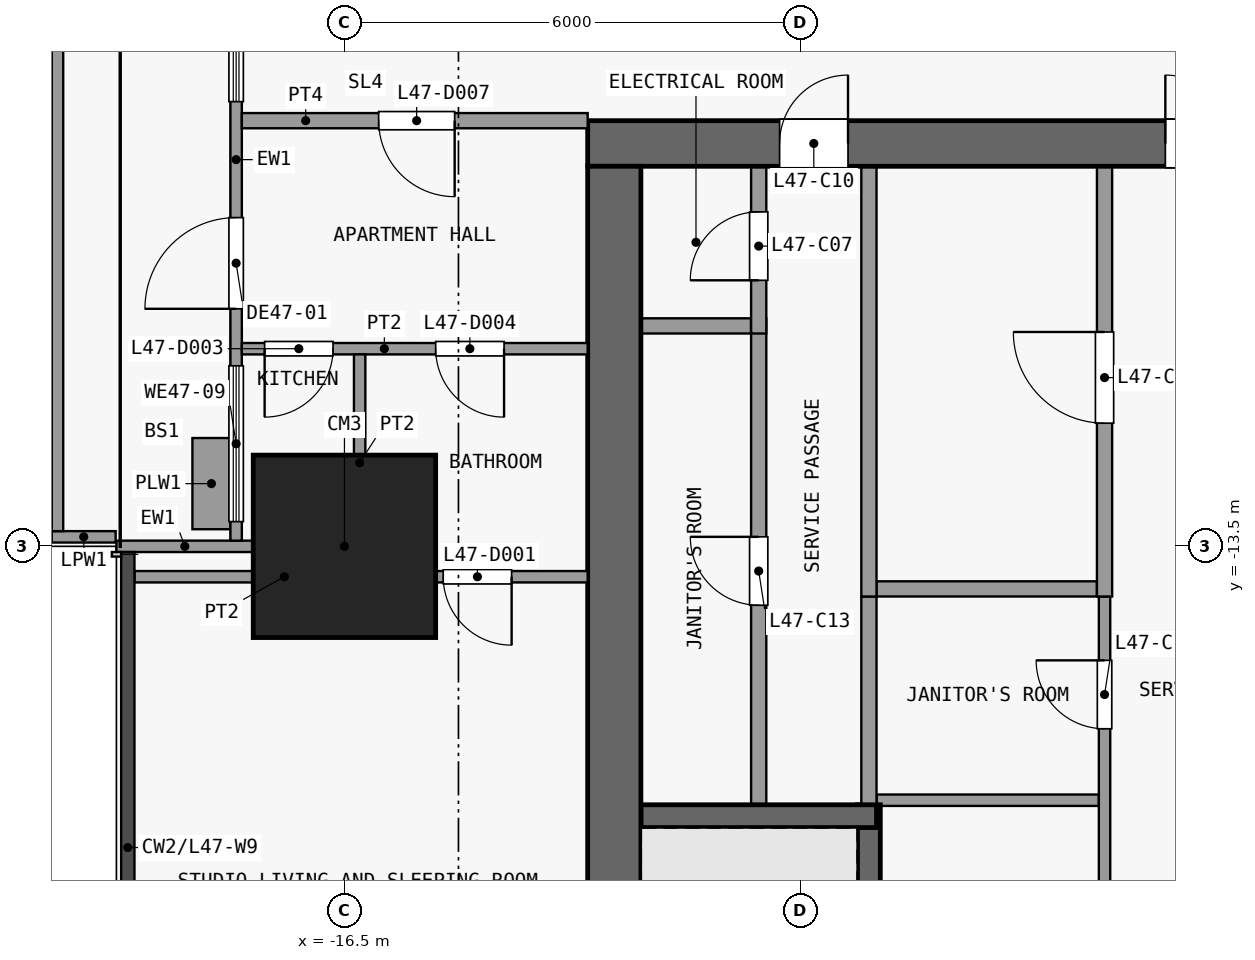
"""IFC4 building model, lengths in metres.
Left out: names, types, materials, properties, quantities, classifications, styles, units other than length and angle.
Written with IfcOpenShell. Run it as: python <this file> out.ifc"""

import sys

from ifc_helpers import new_model, si_unit, direction, frame, frame_2d, origin, origin_2d, place, context, subcontext, project, spatial, rectangle, extrude, element, fill, save


model = new_model("IFC4")
c1 = context("Model", 3, precision=1e-05, world=origin(), true_north=direction((0.0, 1.0)))
c2 = subcontext(c1, "Body", "Model", "MODEL_VIEW")
j1 = project(units=[si_unit("LENGTHUNIT", "METRE"), si_unit("PLANEANGLEUNIT", "RADIAN")], contexts=[c1])
p1 = place(None, origin())
s1 = spatial("IfcSite", under=j1, at=p1, CompositionType="ELEMENT")
p2 = place(p1, origin())
s2 = spatial("IfcBuilding", under=s1, at=p2, CompositionType="ELEMENT")
p3 = place(p2, frame((0.0, 0.0, 188.9)))
s3 = spatial("IfcBuildingStorey", under=s2, at=p3, CompositionType="ELEMENT", Elevation=188.9)
p4 = place(p3, frame((-16.5, -13.5, 0.0), z_axis=(0.0, 0.0, 1.0), x_axis=(1.0, 0.0, 0.0)))
e1 = element("IfcColumn", 1, at=p4, inside=s3, PredefinedType="COLUMN", context=c2, shape_type="SweptSolid", body=[
    extrude(rectangle(XDim=2.4, YDim=2.4, at=origin_2d()), origin(), (0.0, 0.0, 1.0), 3.6),
])
p5 = place(p3, frame((-13.3, -8.2, 0.0), z_axis=(0.0, 0.0, 1.0), x_axis=(1.0, 0.0, 0.0)))
e2 = element("IfcWall", 2, at=p5, inside=s3, PredefinedType="SHEAR", context=c2, shape_type="SweptSolid", body=[
    extrude(rectangle(XDim=26.6, YDim=0.6, at=frame_2d((13.3, 0.0))), origin(), (0.0, 0.0, 1.0), 3.3),
])
p6 = place(p5, frame((7.6, 0.0, 0.0)))
e3 = element("IfcOpeningElement", 3, at=p6, cuts=e2, PredefinedType="OPENING", context=c2, shape_type="SweptSolid", body=[
    extrude(rectangle(XDim=1.8, YDim=2.1, at=frame_2d((0.9, 1.05))), frame((0.0, 0.31, 0.0), z_axis=(0.0, -1.0, 0.0), x_axis=(1.0, 0.0, 0.0)), (0.0, 0.0, 1.0), 0.62),
])
p7 = place(p5, frame((17.2, 0.0, 0.0)))
e4 = element("IfcOpeningElement", 4, at=p7, cuts=e2, PredefinedType="OPENING", context=c2, shape_type="SweptSolid", body=[
    extrude(rectangle(XDim=1.8, YDim=2.1, at=frame_2d((0.9, 1.05))), frame((0.0, 0.31, 0.0), z_axis=(0.0, -1.0, 0.0), x_axis=(1.0, 0.0, 0.0)), (0.0, 0.0, 1.0), 0.62),
])
p8 = place(p5, frame((2.525, 0.0, 0.0)))
e5 = element("IfcOpeningElement", 5, at=p8, cuts=e2, PredefinedType="OPENING", context=c2, shape_type="SweptSolid", body=[
    extrude(rectangle(XDim=0.9, YDim=2.1, at=frame_2d((0.45, 1.05))), frame((0.0, 0.31, 0.0), z_axis=(0.0, -1.0, 0.0), x_axis=(1.0, 0.0, 0.0)), (0.0, 0.0, 1.0), 0.62),
])
p9 = place(p5, frame((23.175, 0.0, 0.0)))
e6 = element("IfcOpeningElement", 6, at=p9, cuts=e2, PredefinedType="OPENING", context=c2, shape_type="SweptSolid", body=[
    extrude(rectangle(XDim=0.9, YDim=2.1, at=frame_2d((0.45, 1.05))), frame((0.0, 0.31, 0.0), z_axis=(0.0, -1.0, 0.0), x_axis=(1.0, 0.0, 0.0)), (0.0, 0.0, 1.0), 0.62),
])
p10 = place(p3, frame((-12.95, -24.6, 0.0), z_axis=(0.0, 0.0, 1.0), x_axis=(0.0, 1.0, 0.0)))
e7 = element("IfcWall", 7, at=p10, inside=s3, PredefinedType="SHEAR", context=c2, shape_type="SweptSolid", body=[
    extrude(rectangle(XDim=16.1, YDim=0.7, at=frame_2d((8.05, 0.0))), origin(), (0.0, 0.0, 1.0), 3.3),
])
p11 = place(p3, frame((-12.6, -17.05, 0.0), z_axis=(0.0, 0.0, 1.0), x_axis=(1.0, 0.0, 0.0)))
e8 = element("IfcWall", 8, at=p11, inside=s3, PredefinedType="SHEAR", context=c2, shape_type="SweptSolid", body=[
    extrude(rectangle(XDim=3.1, YDim=0.3, at=frame_2d((1.55, 0.0))), origin(), (0.0, 0.0, 1.0), 3.3),
])
p12 = place(p3, frame((-9.5, -16.84, 0.0), z_axis=(0.0, 0.0, 1.0), x_axis=(1.0, 0.0, 0.0)))
e9 = element("IfcWall", 9, at=p12, inside=s3, PredefinedType="PARTITIONING", context=c2, shape_type="SweptSolid", body=[
    extrude(rectangle(XDim=2.925, YDim=0.15, at=frame_2d((1.462, 0.0))), origin(), (0.0, 0.0, 1.0), 3.3),
])
p13 = place(p3, frame((-9.5, -14.06, 0.0), z_axis=(0.0, 0.0, 1.0), x_axis=(1.0, 0.0, 0.0)))
e10 = element("IfcWall", 10, at=p13, inside=s3, PredefinedType="PARTITIONING", context=c2, shape_type="SweptSolid", body=[
    extrude(rectangle(XDim=2.9, YDim=0.2, at=frame_2d((1.45, 0.0))), origin(), (0.0, 0.0, 1.0), 3.3),
])
p14 = place(p3, frame((-12.6, -10.6, 0.0), z_axis=(0.0, 0.0, 1.0), x_axis=(1.0, 0.0, 0.0)))
e11 = element("IfcWall", 11, at=p14, inside=s3, PredefinedType="PARTITIONING", context=c2, shape_type="SweptSolid", body=[
    extrude(rectangle(XDim=1.45, YDim=0.2, at=frame_2d((0.725, 0.0))), origin(), (0.0, 0.0, 1.0), 3.3),
])
p15 = place(p3, frame((-11.05, -16.9, 0.0), z_axis=(0.0, 0.0, 1.0), x_axis=(0.0, 1.0, 0.0)))
e12 = element("IfcWall", 12, at=p15, inside=s3, PredefinedType="PARTITIONING", context=c2, shape_type="SweptSolid", body=[
    extrude(rectangle(XDim=6.4, YDim=0.2, at=frame_2d((3.2, 0.0))), origin(), (0.0, 0.0, 1.0), 3.3),
])
p16 = place(p15, frame((2.625, 0.0, 0.0)))
e13 = element("IfcOpeningElement", 13, at=p16, cuts=e12, PredefinedType="OPENING", context=c2, shape_type="SweptSolid", body=[
    extrude(rectangle(XDim=0.9, YDim=2.1, at=frame_2d((0.45, 1.05))), frame((0.0, 0.11, 0.0), z_axis=(0.0, -1.0, 0.0), x_axis=(1.0, 0.0, 0.0)), (0.0, 0.0, 1.0), 0.22),
])
p17 = place(p3, frame((-11.05, -10.7, 0.0), z_axis=(0.0, 0.0, 1.0), x_axis=(0.0, 1.0, 0.0)))
e14 = element("IfcWall", 14, at=p17, inside=s3, PredefinedType="PARTITIONING", context=c2, shape_type="SweptSolid", body=[
    extrude(rectangle(XDim=2.2, YDim=0.2, at=frame_2d((1.1, 0.0))), origin(), (0.0, 0.0, 1.0), 3.3),
])
p18 = place(p17, frame((0.7, 0.0, 0.0)))
e15 = element("IfcOpeningElement", 15, at=p18, cuts=e14, PredefinedType="OPENING", context=c2, shape_type="SweptSolid", body=[
    extrude(rectangle(XDim=0.9, YDim=2.1, at=frame_2d((0.45, 1.05))), frame((0.0, 0.11, 0.0), z_axis=(0.0, -1.0, 0.0), x_axis=(1.0, 0.0, 0.0)), (0.0, 0.0, 1.0), 0.22),
])
p19 = place(p3, frame((-9.6, -24.6, 0.0), z_axis=(0.0, 0.0, 1.0), x_axis=(0.0, 1.0, 0.0)))
e16 = element("IfcWall", 16, at=p19, inside=s3, PredefinedType="SHEAR", context=c2, shape_type="SweptSolid", body=[
    extrude(rectangle(XDim=7.7, YDim=0.3, at=frame_2d((3.85, 0.0))), origin(), (0.0, 0.0, 1.0), 3.3),
])
p20 = place(p19, frame((0.1, 0.0, 0.0)))
e17 = element("IfcOpeningElement", 17, at=p20, cuts=e16, PredefinedType="OPENING", context=c2, shape_type="SweptSolid", body=[
    extrude(rectangle(XDim=1.1, YDim=2.1, at=frame_2d((0.55, 1.05))), frame((0.0, 0.16, 0.0), z_axis=(0.0, -1.0, 0.0), x_axis=(1.0, 0.0, 0.0)), (0.0, 0.0, 1.0), 0.32),
])
p21 = place(p3, frame((-9.6, -16.9, 0.0), z_axis=(0.0, 0.0, 1.0), x_axis=(0.0, 1.0, 0.0)))
e18 = element("IfcWall", 18, at=p21, inside=s3, PredefinedType="PARTITIONING", context=c2, shape_type="SweptSolid", body=[
    extrude(rectangle(XDim=2.74, YDim=0.2, at=frame_2d((1.37, 0.0))), origin(), (0.0, 0.0, 1.0), 3.3),
])
p22 = place(p3, frame((-9.6, -14.16, 0.0), z_axis=(0.0, 0.0, 1.0), x_axis=(0.0, 1.0, 0.0)))
e19 = element("IfcWall", 19, at=p22, inside=s3, PredefinedType="PARTITIONING", context=c2, shape_type="SweptSolid", body=[
    extrude(rectangle(XDim=5.66, YDim=0.2, at=frame_2d((2.83, 0.0))), origin(), (0.0, 0.0, 1.0), 3.3),
])
p23 = place(p3, frame((-6.5, -22.3, 0.0), z_axis=(0.0, 0.0, 1.0), x_axis=(0.0, 1.0, 0.0)))
e20 = element("IfcWall", 20, at=p23, inside=s3, PredefinedType="PARTITIONING", context=c2, shape_type="SweptSolid", body=[
    extrude(rectangle(XDim=8.14, YDim=0.15, at=frame_2d((4.07, 0.0))), origin(), (0.0, 0.0, 1.0), 3.3),
])
p24 = place(p23, frame((2.08, 0.0, 0.0)))
e21 = element("IfcOpeningElement", 21, at=p24, cuts=e20, PredefinedType="OPENING", context=c2, shape_type="SweptSolid", body=[
    extrude(rectangle(XDim=1.2, YDim=2.1, at=frame_2d((0.6, 1.05))), frame((0.0, 0.085, 0.0), z_axis=(0.0, -1.0, 0.0), x_axis=(1.0, 0.0, 0.0)), (0.0, 0.0, 1.0), 0.17),
])
p25 = place(p23, frame((6.4, 0.0, 0.0)))
e22 = element("IfcOpeningElement", 22, at=p25, cuts=e20, PredefinedType="OPENING", context=c2, shape_type="SweptSolid", body=[
    extrude(rectangle(XDim=0.9, YDim=2.1, at=frame_2d((0.45, 1.05))), frame((0.0, 0.085, 0.0), z_axis=(0.0, -1.0, 0.0), x_axis=(1.0, 0.0, 0.0)), (0.0, 0.0, 1.0), 0.17),
])
p26 = place(p3, frame((-6.5, -14.16, 0.0), z_axis=(0.0, 0.0, 1.0), x_axis=(0.0, 1.0, 0.0)))
e23 = element("IfcWall", 23, at=p26, inside=s3, PredefinedType="PARTITIONING", context=c2, shape_type="SweptSolid", body=[
    extrude(rectangle(XDim=5.66, YDim=0.2, at=frame_2d((2.83, 0.0))), origin(), (0.0, 0.0, 1.0), 3.3),
])
p27 = place(p26, frame((2.28, 0.0, 0.0)))
e24 = element("IfcOpeningElement", 24, at=p27, cuts=e23, PredefinedType="OPENING", context=c2, shape_type="SweptSolid", body=[
    extrude(rectangle(XDim=1.2, YDim=2.1, at=frame_2d((0.6, 1.05))), frame((0.0, 0.11, 0.0), z_axis=(0.0, -1.0, 0.0), x_axis=(1.0, 0.0, 0.0)), (0.0, 0.0, 1.0), 0.22),
])
p28 = place(p3, frame((-17.7, -13.5, 0.0), z_axis=(0.0, 0.0, 1.0), x_axis=(-1.0, 0.0, 0.0)))
e25 = element("IfcWall", 25, at=p28, inside=s3, PredefinedType="SOLIDWALL", context=c2, shape_type="SweptSolid", body=[
    extrude(rectangle(XDim=1.8, YDim=0.15, at=frame_2d((0.9, 0.0))), origin(), (0.0, 0.0, 1.0), 3.3),
])
p29 = place(p3, frame((-17.925, -13.425, 0.0), z_axis=(0.0, 0.0, 1.0), x_axis=(0.0, 1.0, 0.0)))
e26 = element("IfcWall", 26, at=p29, inside=s3, PredefinedType="SOLIDWALL", context=c2, shape_type="SweptSolid", body=[
    extrude(rectangle(XDim=8.925, YDim=0.15, at=frame_2d((4.462, 0.0))), origin(), (0.0, 0.0, 1.0), 3.3),
])
p30 = place(p29, frame((3.05, 0.0, 0.0)))
e27 = element("IfcOpeningElement", 27, at=p30, cuts=e26, PredefinedType="OPENING", context=c2, shape_type="SweptSolid", body=[
    extrude(rectangle(XDim=1.2, YDim=2.4, at=frame_2d((0.6, 1.2))), frame((0.0, 0.085, 0.0), z_axis=(0.0, -1.0, 0.0), x_axis=(1.0, 0.0, 0.0)), (0.0, 0.0, 1.0), 0.17),
])
p31 = place(p29, frame((0.25, 0.0, 0.9)))
e28 = element("IfcOpeningElement", 28, at=p31, cuts=e26, PredefinedType="OPENING", context=c2, shape_type="SweptSolid", body=[
    extrude(rectangle(XDim=2.05, YDim=2.1, at=frame_2d((1.025, 1.05))), frame((0.0, 0.085, 0.0), z_axis=(0.0, -1.0, 0.0), x_axis=(1.0, 0.0, 0.0)), (0.0, 0.0, 1.0), 0.17),
])
p32 = place(p29, frame((5.775, 0.0, 0.9)))
e29 = element("IfcOpeningElement", 29, at=p32, cuts=e26, PredefinedType="OPENING", context=c2, shape_type="SweptSolid", body=[
    extrude(rectangle(XDim=2.312, YDim=2.1, at=frame_2d((1.156, 1.05))), frame((0.0, 0.085, 0.0), z_axis=(0.0, -1.0, 0.0), x_axis=(1.0, 0.0, 0.0)), (0.0, 0.0, 1.0), 0.17),
])
p33 = place(p3, frame((-18.25, -13.275, 0.0), z_axis=(0.0, 0.0, 1.0), x_axis=(0.0, 1.0, 0.0)))
e30 = element("IfcWall", 30, at=p33, inside=s3, PredefinedType="USERDEFINED", context=c2, shape_type="SweptSolid", body=[
    extrude(rectangle(XDim=1.2, YDim=0.5, at=frame_2d((0.6, 0.0))), origin(), (0.0, 0.0, 1.0), 0.9),
])
p34 = place(p3, frame((-19.51, -13.375, 0.0), z_axis=(0.0, 0.0, 1.0), x_axis=(-1.0, 0.0, 0.0)))
e31 = element("IfcWall", 31, at=p34, inside=s3, PredefinedType="PARAPET", context=c2, shape_type="SweptSolid", body=[
    extrude(rectangle(XDim=0.84, YDim=0.15, at=frame_2d((0.42, 0.0))), origin(), (0.0, 0.0, 1.0), 1.15),
])
p35 = place(p3, frame((-20.275, -13.3, 0.0), z_axis=(0.0, 0.0, 1.0), x_axis=(0.0, 1.0, 0.0)))
e32 = element("IfcWall", 32, at=p35, inside=s3, PredefinedType="PARAPET", context=c2, shape_type="SweptSolid", body=[
    extrude(rectangle(XDim=14.79, YDim=0.15, at=frame_2d((7.395, 0.0))), origin(), (0.0, 0.0, 1.0), 1.15),
])
p36 = place(p3, frame((-19.262, -13.9, 0.0), z_axis=(0.0, 0.0, 1.0), x_axis=(1.0, 0.0, 0.0)))
e33 = element("IfcWall", 33, at=p36, inside=s3, PredefinedType="PARTITIONING", context=c2, shape_type="SweptSolid", body=[
    extrude(rectangle(XDim=5.962, YDim=0.15, at=frame_2d((2.981, 0.0))), origin(), (0.0, 0.0, 1.0), 3.3),
])
p37 = place(p36, frame((4.062, 0.0, 0.0)))
e34 = element("IfcOpeningElement", 34, at=p37, cuts=e33, PredefinedType="OPENING", context=c2, shape_type="SweptSolid", body=[
    extrude(rectangle(XDim=0.9, YDim=2.1, at=frame_2d((0.45, 1.05))), frame((0.0, 0.085, 0.0), z_axis=(0.0, -1.0, 0.0), x_axis=(1.0, 0.0, 0.0)), (0.0, 0.0, 1.0), 0.17),
])
p38 = place(p3, frame((-17.85, -10.9, 0.0), z_axis=(0.0, 0.0, 1.0), x_axis=(1.0, 0.0, 0.0)))
e35 = element("IfcWall", 35, at=p38, inside=s3, PredefinedType="PARTITIONING", context=c2, shape_type="SweptSolid", body=[
    extrude(rectangle(XDim=4.55, YDim=0.15, at=frame_2d((2.275, 0.0))), origin(), (0.0, 0.0, 1.0), 3.3),
])
p39 = place(p38, frame((0.3, 0.0, 0.0)))
e36 = element("IfcOpeningElement", 36, at=p39, cuts=e35, PredefinedType="OPENING", context=c2, shape_type="SweptSolid", body=[
    extrude(rectangle(XDim=0.9, YDim=2.1, at=frame_2d((0.45, 1.05))), frame((0.0, 0.085, 0.0), z_axis=(0.0, -1.0, 0.0), x_axis=(1.0, 0.0, 0.0)), (0.0, 0.0, 1.0), 0.17),
])
p40 = place(p38, frame((2.55, 0.0, 0.0)))
e37 = element("IfcOpeningElement", 37, at=p40, cuts=e35, PredefinedType="OPENING", context=c2, shape_type="SweptSolid", body=[
    extrude(rectangle(XDim=0.9, YDim=2.1, at=frame_2d((0.45, 1.05))), frame((0.0, 0.085, 0.0), z_axis=(0.0, -1.0, 0.0), x_axis=(1.0, 0.0, 0.0)), (0.0, 0.0, 1.0), 0.17),
])
p41 = place(p3, frame((-17.85, -7.9, 0.0), z_axis=(0.0, 0.0, 1.0), x_axis=(1.0, 0.0, 0.0)))
e38 = element("IfcWall", 38, at=p41, inside=s3, PredefinedType="PARTITIONING", context=c2, shape_type="SweptSolid", body=[
    extrude(rectangle(XDim=4.55, YDim=0.2, at=frame_2d((2.275, 0.0))), origin(), (0.0, 0.0, 1.0), 3.3),
])
p42 = place(p41, frame((1.8, 0.0, 0.0)))
e39 = element("IfcOpeningElement", 39, at=p42, cuts=e38, PredefinedType="OPENING", context=c2, shape_type="SweptSolid", body=[
    extrude(rectangle(XDim=1.0, YDim=2.1, at=frame_2d((0.5, 1.05))), frame((0.0, 0.11, 0.0), z_axis=(0.0, -1.0, 0.0), x_axis=(1.0, 0.0, 0.0)), (0.0, 0.0, 1.0), 0.22),
])
p43 = place(p3, frame((-16.3, -13.825, 0.0), z_axis=(0.0, 0.0, 1.0), x_axis=(0.0, 1.0, 0.0)))
e40 = element("IfcWall", 40, at=p43, inside=s3, PredefinedType="PARTITIONING", context=c2, shape_type="SweptSolid", body=[
    extrude(rectangle(XDim=2.85, YDim=0.15, at=frame_2d((1.425, 0.0))), origin(), (0.0, 0.0, 1.0), 3.3),
])
p44 = place(p6, origin())
e41 = element("IfcDoor", 41, at=p44, inside=s3, OperationType="DOUBLE_DOOR_SINGLE_SWING", PredefinedType="DOOR", context=c2, shape_type="SweptSolid", body=[
    extrude(rectangle(XDim=1.8, YDim=2.1, at=frame_2d((0.9, 1.05))), frame((0.0, 0.025, 0.0), z_axis=(0.0, -1.0, 0.0), x_axis=(1.0, 0.0, 0.0)), (0.0, 0.0, 1.0), 0.05),
])
fill(e3, e41)
p45 = place(p18, origin())
e42 = element("IfcDoor", 42, at=p45, inside=s3, OperationType="SINGLE_SWING_LEFT", PredefinedType="DOOR", context=c2, shape_type="SweptSolid", body=[
    extrude(rectangle(XDim=0.9, YDim=2.1, at=frame_2d((0.45, 1.05))), frame((0.0, 0.025, 0.0), z_axis=(0.0, -1.0, 0.0), x_axis=(1.0, 0.0, 0.0)), (0.0, 0.0, 1.0), 0.05),
])
fill(e15, e42)
p46 = place(p27, origin())
e43 = element("IfcDoor", 43, at=p46, inside=s3, OperationType="SINGLE_SWING_RIGHT", PredefinedType="DOOR", context=c2, shape_type="SweptSolid", body=[
    extrude(rectangle(XDim=1.2, YDim=2.1, at=frame_2d((0.6, 1.05))), frame((0.0, 0.025, 0.0), z_axis=(0.0, -1.0, 0.0), x_axis=(1.0, 0.0, 0.0)), (0.0, 0.0, 1.0), 0.05),
])
fill(e24, e43)
p47 = place(p8, origin())
e44 = element("IfcDoor", 44, at=p47, inside=s3, OperationType="SINGLE_SWING_RIGHT", PredefinedType="DOOR", context=c2, shape_type="SweptSolid", body=[
    extrude(rectangle(XDim=0.9, YDim=2.1, at=frame_2d((0.45, 1.05))), frame((0.0, 0.025, 0.0), z_axis=(0.0, -1.0, 0.0), x_axis=(1.0, 0.0, 0.0)), (0.0, 0.0, 1.0), 0.05),
])
fill(e5, e44)
p48 = place(p16, origin())
e45 = element("IfcDoor", 45, at=p48, inside=s3, OperationType="SINGLE_SWING_RIGHT", PredefinedType="DOOR", context=c2, shape_type="SweptSolid", body=[
    extrude(rectangle(XDim=0.9, YDim=2.1, at=frame_2d((0.45, 1.05))), frame((0.0, 0.025, 0.0), z_axis=(0.0, -1.0, 0.0), x_axis=(1.0, 0.0, 0.0)), (0.0, 0.0, 1.0), 0.05),
])
fill(e13, e45)
p49 = place(p25, origin())
e46 = element("IfcDoor", 46, at=p49, inside=s3, OperationType="SINGLE_SWING_RIGHT", PredefinedType="DOOR", context=c2, shape_type="SweptSolid", body=[
    extrude(rectangle(XDim=0.9, YDim=2.1, at=frame_2d((0.45, 1.05))), frame((0.0, 0.025, 0.0), z_axis=(0.0, -1.0, 0.0), x_axis=(1.0, 0.0, 0.0)), (0.0, 0.0, 1.0), 0.05),
])
fill(e22, e46)
p50 = place(p30, origin())
e47 = element("IfcDoor", 47, at=p50, inside=s3, OperationType="SINGLE_SWING_LEFT", PredefinedType="DOOR", context=c2, shape_type="SweptSolid", body=[
    extrude(rectangle(XDim=1.2, YDim=2.4, at=frame_2d((0.6, 1.2))), frame((0.0, 0.025, 0.0), z_axis=(0.0, -1.0, 0.0), x_axis=(1.0, 0.0, 0.0)), (0.0, 0.0, 1.0), 0.05),
])
fill(e27, e47)
p51 = place(p31, origin())
e48 = element("IfcWindow", 48, at=p51, inside=s3, PartitioningType="SINGLE_PANEL", PredefinedType="WINDOW", context=c2, shape_type="SweptSolid", body=[
    extrude(rectangle(XDim=2.05, YDim=2.1, at=frame_2d((1.025, 1.05))), frame((0.0, 0.03, 0.0), z_axis=(0.0, -1.0, 0.0), x_axis=(1.0, 0.0, 0.0)), (0.0, 0.0, 1.0), 0.06),
])
fill(e28, e48)
p52 = place(p32, origin())
e49 = element("IfcWindow", 49, at=p52, inside=s3, PartitioningType="SINGLE_PANEL", PredefinedType="WINDOW", context=c2, shape_type="SweptSolid", body=[
    extrude(rectangle(XDim=2.312, YDim=2.1, at=frame_2d((1.156, 1.05))), frame((0.0, 0.03, 0.0), z_axis=(0.0, -1.0, 0.0), x_axis=(1.0, 0.0, 0.0)), (0.0, 0.0, 1.0), 0.06),
])
fill(e29, e49)
p53 = place(p37, origin())
e50 = element("IfcDoor", 50, at=p53, inside=s3, OperationType="SINGLE_SWING_RIGHT", PredefinedType="DOOR", context=c2, shape_type="SweptSolid", body=[
    extrude(rectangle(XDim=0.9, YDim=2.1, at=frame_2d((0.45, 1.05))), frame((0.0, 0.025, 0.0), z_axis=(0.0, -1.0, 0.0), x_axis=(1.0, 0.0, 0.0)), (0.0, 0.0, 1.0), 0.05),
])
fill(e34, e50)
p54 = place(p39, origin())
e51 = element("IfcDoor", 51, at=p54, inside=s3, OperationType="SINGLE_SWING_LEFT", PredefinedType="DOOR", context=c2, shape_type="SweptSolid", body=[
    extrude(rectangle(XDim=0.9, YDim=2.1, at=frame_2d((0.45, 1.05))), frame((0.0, 0.025, 0.0), z_axis=(0.0, -1.0, 0.0), x_axis=(1.0, 0.0, 0.0)), (0.0, 0.0, 1.0), 0.05),
])
fill(e36, e51)
p55 = place(p40, origin())
e52 = element("IfcDoor", 52, at=p55, inside=s3, OperationType="SINGLE_SWING_RIGHT", PredefinedType="DOOR", context=c2, shape_type="SweptSolid", body=[
    extrude(rectangle(XDim=0.9, YDim=2.1, at=frame_2d((0.45, 1.05))), frame((0.0, 0.025, 0.0), z_axis=(0.0, -1.0, 0.0), x_axis=(1.0, 0.0, 0.0)), (0.0, 0.0, 1.0), 0.05),
])
fill(e37, e52)
p56 = place(p42, origin())
e53 = element("IfcDoor", 53, at=p56, inside=s3, OperationType="SINGLE_SWING_RIGHT", PredefinedType="DOOR", context=c2, shape_type="SweptSolid", body=[
    extrude(rectangle(XDim=1.0, YDim=2.1, at=frame_2d((0.5, 1.05))), frame((0.0, 0.025, 0.0), z_axis=(0.0, -1.0, 0.0), x_axis=(1.0, 0.0, 0.0)), (0.0, 0.0, 1.0), 0.05),
])
fill(e39, e53)
save(model, sys.argv[1])
